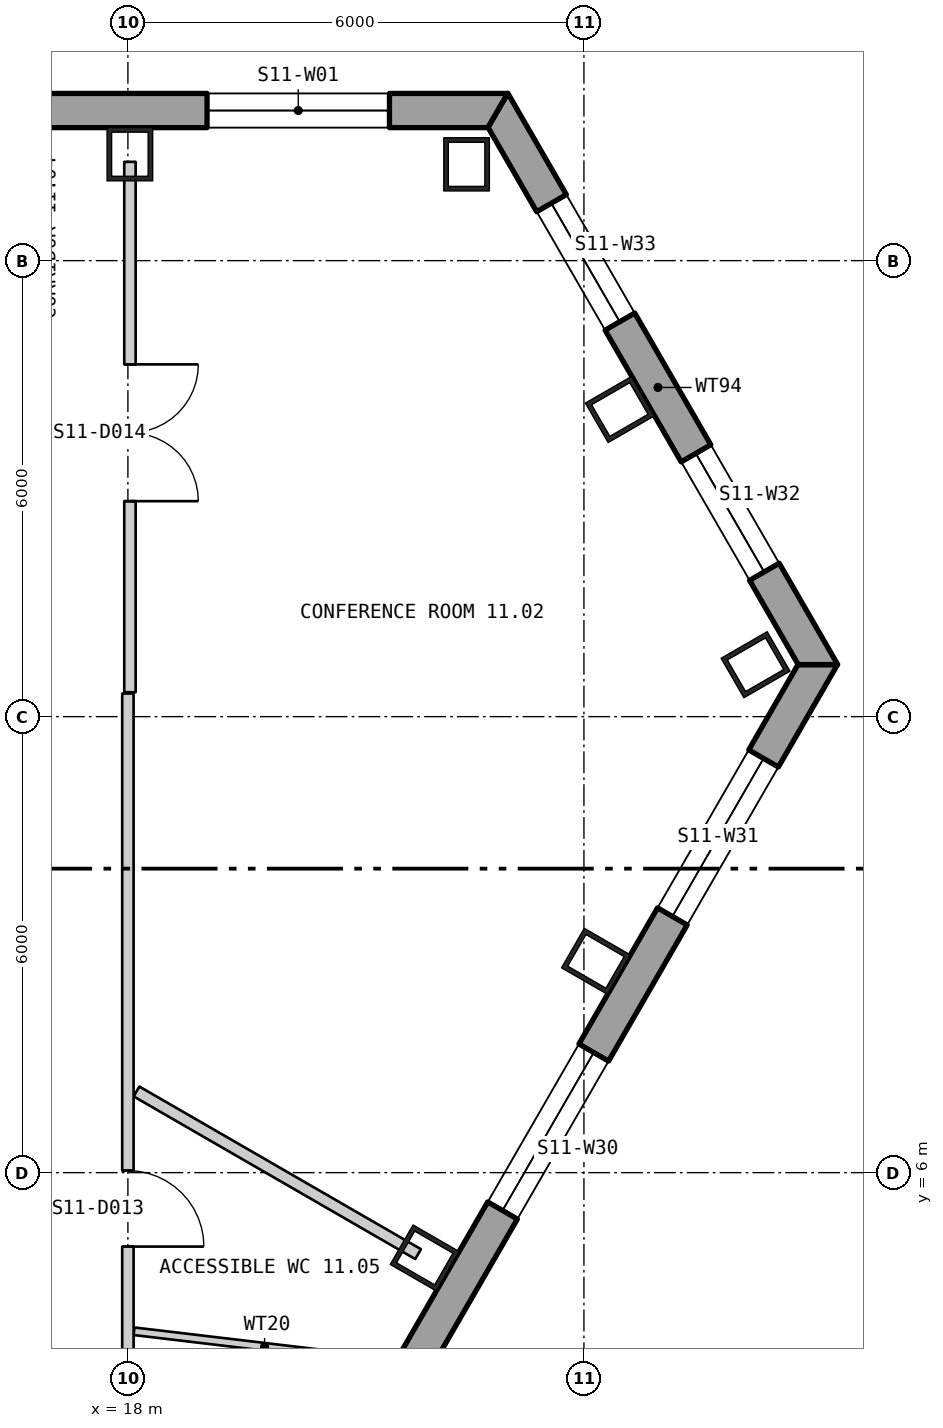
"""IFC4 building model, lengths in metres.
Left out: names, types, materials, properties, quantities, classifications, styles, units other than length and angle.
Written with IfcOpenShell. Run it as: python <this file> out.ifc"""

import sys

from ifc_helpers import new_model, si_unit, direction, frame, frame_2d, origin, origin_2d, place, context, subcontext, project, spatial, polyline, rectangle, hollow_rectangle, outline, extrude, element, fill, save


model = new_model("IFC4")
c1 = context("Model", 3, precision=1e-05, world=origin(), true_north=direction((0.0, 1.0)))
c2 = subcontext(c1, "Body", "Model", "MODEL_VIEW")
j1 = project(units=[si_unit("LENGTHUNIT", "METRE"), si_unit("PLANEANGLEUNIT", "RADIAN")], contexts=[c1])
p1 = place(None, origin())
s1 = spatial("IfcSite", under=j1, at=p1, CompositionType="ELEMENT")
p2 = place(p1, origin())
s2 = spatial("IfcBuilding", under=s1, at=p2, CompositionType="ELEMENT")
p3 = place(p2, frame((0.0, 0.0, 151.5)))
s3 = spatial("IfcBuildingStorey", under=s2, at=p3, CompositionType="ELEMENT", Elevation=151.5)
for number, where, z_axis, x_axis in (
    (1, (22.456, 19.267, 0.0), (0.0, 0.0, 1.0), (-1.0, 0.0, 0.0)),
    (2, (18.026, 19.4, 0.0), (0.0, 0.0, 1.0), (-1.0, 0.0, 0.0)),
    (3, (21.905, 4.877, 0.0), (0.0, 0.0, 1.0), (0.5, 0.866, 0.0)),
    (4, (24.158, 8.78, 0.0), (0.0, 0.0, 1.0), (0.5, 0.866, 0.0)),
    (5, (26.258, 12.683, 0.0), (0.0, 0.0, 1.0), (-0.5, 0.866, 0.0)),
    (6, (24.472, 16.041, 0.0), (0.0, 0.0, 1.0), (-0.5, 0.866, 0.0)),
):
    element("IfcColumn", number, at=place(p3, frame(where, z_axis=z_axis, x_axis=x_axis)), inside=s3, PredefinedType="COLUMN", context=c2, shape_type="SweptSolid", body=[
        extrude(hollow_rectangle(XDim=0.6, YDim=0.7, WallThickness=0.06, at=origin_2d()), origin(), (0.0, 0.0, 1.0), 3.9),
    ])
p4 = place(p3, frame((22.865, 19.975, -0.4), z_axis=(0.0, 0.0, 1.0), x_axis=(-1.0, 0.0, 0.0)))
e7 = element("IfcWall", 7, at=p4, inside=s3, PredefinedType="SOLIDWALL", context=c2, shape_type="SweptSolid", body=[
    extrude(outline(polyline([(-0.13, -0.225), (45.86, -0.225), (45.6, 0.225), (0.13, 0.225), (-0.13, -0.225)])), origin(), (0.0, 0.0, 1.0), 3.9),
])
p5 = place(p4, frame((1.424, 0.0, 1.3)))
e8 = element("IfcOpeningElement", 8, at=p5, cuts=e7, PredefinedType="OPENING", context=c2, shape_type="SweptSolid", body=[
    extrude(rectangle(XDim=2.4, YDim=2.0, at=frame_2d((1.2, 1.0))), frame((0.0, 0.235, 0.0), z_axis=(0.0, -1.0, 0.0), x_axis=(1.0, 0.0, 0.0)), (0.0, 0.0, 1.0), 0.47),
])
p6 = place(p4, frame((10.399, 0.0, 1.3)))
e9 = element("IfcOpeningElement", 9, at=p6, cuts=e7, PredefinedType="OPENING", context=c2, shape_type="SweptSolid", body=[
    extrude(rectangle(XDim=2.4, YDim=2.0, at=frame_2d((1.2, 1.0))), frame((0.0, 0.235, 0.0), z_axis=(0.0, -1.0, 0.0), x_axis=(1.0, 0.0, 0.0)), (0.0, 0.0, 1.0), 0.47),
])
p7 = place(p4, frame((14.905, 0.0, 1.3)))
e10 = element("IfcOpeningElement", 10, at=p7, cuts=e7, PredefinedType="OPENING", context=c2, shape_type="SweptSolid", body=[
    extrude(rectangle(XDim=2.4, YDim=2.0, at=frame_2d((1.2, 1.0))), frame((0.0, 0.235, 0.0), z_axis=(0.0, -1.0, 0.0), x_axis=(1.0, 0.0, 0.0)), (0.0, 0.0, 1.0), 0.47),
])
p8 = place(p4, frame((19.412, 0.0, 1.3)))
e11 = element("IfcOpeningElement", 11, at=p8, cuts=e7, PredefinedType="OPENING", context=c2, shape_type="SweptSolid", body=[
    extrude(rectangle(XDim=2.4, YDim=2.0, at=frame_2d((1.2, 1.0))), frame((0.0, 0.235, 0.0), z_axis=(0.0, -1.0, 0.0), x_axis=(1.0, 0.0, 0.0)), (0.0, 0.0, 1.0), 0.47),
])
p9 = place(p4, frame((23.918, 0.0, 1.3)))
e12 = element("IfcOpeningElement", 12, at=p9, cuts=e7, PredefinedType="OPENING", context=c2, shape_type="SweptSolid", body=[
    extrude(rectangle(XDim=2.4, YDim=2.0, at=frame_2d((1.2, 1.0))), frame((0.0, 0.235, 0.0), z_axis=(0.0, -1.0, 0.0), x_axis=(1.0, 0.0, 0.0)), (0.0, 0.0, 1.0), 0.47),
])
p10 = place(p4, frame((28.425, 0.0, 1.3)))
e13 = element("IfcOpeningElement", 13, at=p10, cuts=e7, PredefinedType="OPENING", context=c2, shape_type="SweptSolid", body=[
    extrude(rectangle(XDim=2.4, YDim=2.0, at=frame_2d((1.2, 1.0))), frame((0.0, 0.235, 0.0), z_axis=(0.0, -1.0, 0.0), x_axis=(1.0, 0.0, 0.0)), (0.0, 0.0, 1.0), 0.47),
])
p11 = place(p4, frame((32.932, 0.0, 1.3)))
e14 = element("IfcOpeningElement", 14, at=p11, cuts=e7, PredefinedType="OPENING", context=c2, shape_type="SweptSolid", body=[
    extrude(rectangle(XDim=2.4, YDim=2.0, at=frame_2d((1.2, 1.0))), frame((0.0, 0.235, 0.0), z_axis=(0.0, -1.0, 0.0), x_axis=(1.0, 0.0, 0.0)), (0.0, 0.0, 1.0), 0.47),
])
p12 = place(p4, frame((37.438, 0.0, 1.3)))
e15 = element("IfcOpeningElement", 15, at=p12, cuts=e7, PredefinedType="OPENING", context=c2, shape_type="SweptSolid", body=[
    extrude(rectangle(XDim=2.4, YDim=2.0, at=frame_2d((1.2, 1.0))), frame((0.0, 0.235, 0.0), z_axis=(0.0, -1.0, 0.0), x_axis=(1.0, 0.0, 0.0)), (0.0, 0.0, 1.0), 0.47),
])
p13 = place(p4, frame((41.907, 0.0, 1.3)))
e16 = element("IfcOpeningElement", 16, at=p13, cuts=e7, PredefinedType="OPENING", context=c2, shape_type="SweptSolid", body=[
    extrude(rectangle(XDim=2.4, YDim=2.0, at=frame_2d((1.2, 1.0))), frame((0.0, 0.235, 0.0), z_axis=(0.0, -1.0, 0.0), x_axis=(1.0, 0.0, 0.0)), (0.0, 0.0, 1.0), 0.47),
])
p14 = place(p3, frame((4.21, -26.921, -0.18), z_axis=(0.0, 0.0, 1.0), x_axis=(0.500000141277, 0.866025322218, 0.0)))
e17 = element("IfcWall", 17, at=p14, inside=s3, PredefinedType="SOLIDWALL", context=c2, shape_type="SweptSolid", body=[
    extrude(outline(polyline([(-0.13, -0.225), (45.86, -0.225), (45.6, 0.225), (0.13, 0.225), (-0.13, -0.225)])), origin(), (0.0, 0.0, 1.0), 3.68),
])
p15 = place(p14, frame((1.424, 0.0, 1.08)))
e18 = element("IfcOpeningElement", 18, at=p15, cuts=e17, PredefinedType="OPENING", context=c2, shape_type="SweptSolid", body=[
    extrude(rectangle(XDim=2.4, YDim=2.0, at=frame_2d((1.2, 1.0))), frame((0.0, 0.235, 0.0), z_axis=(0.0, -1.0, 0.0), x_axis=(1.0, 0.0, 0.0)), (0.0, 0.0, 1.0), 0.47),
])
p16 = place(p14, frame((5.892, 0.0, 1.08)))
e19 = element("IfcOpeningElement", 19, at=p16, cuts=e17, PredefinedType="OPENING", context=c2, shape_type="SweptSolid", body=[
    extrude(rectangle(XDim=2.4, YDim=2.0, at=frame_2d((1.2, 1.0))), frame((0.0, 0.235, 0.0), z_axis=(0.0, -1.0, 0.0), x_axis=(1.0, 0.0, 0.0)), (0.0, 0.0, 1.0), 0.47),
])
p17 = place(p14, frame((10.399, 0.0, 1.08)))
e20 = element("IfcOpeningElement", 20, at=p17, cuts=e17, PredefinedType="OPENING", context=c2, shape_type="SweptSolid", body=[
    extrude(rectangle(XDim=2.4, YDim=2.0, at=frame_2d((1.2, 1.0))), frame((0.0, 0.235, 0.0), z_axis=(0.0, -1.0, 0.0), x_axis=(1.0, 0.0, 0.0)), (0.0, 0.0, 1.0), 0.47),
])
p18 = place(p14, frame((14.905, 0.0, 1.08)))
e21 = element("IfcOpeningElement", 21, at=p18, cuts=e17, PredefinedType="OPENING", context=c2, shape_type="SweptSolid", body=[
    extrude(rectangle(XDim=2.4, YDim=2.0, at=frame_2d((1.2, 1.0))), frame((0.0, 0.235, 0.0), z_axis=(0.0, -1.0, 0.0), x_axis=(1.0, 0.0, 0.0)), (0.0, 0.0, 1.0), 0.47),
])
p19 = place(p14, frame((19.412, 0.0, 1.08)))
e22 = element("IfcOpeningElement", 22, at=p19, cuts=e17, PredefinedType="OPENING", context=c2, shape_type="SweptSolid", body=[
    extrude(rectangle(XDim=2.4, YDim=2.0, at=frame_2d((1.2, 1.0))), frame((0.0, 0.235, 0.0), z_axis=(0.0, -1.0, 0.0), x_axis=(1.0, 0.0, 0.0)), (0.0, 0.0, 1.0), 0.47),
])
p20 = place(p14, frame((23.918, 0.0, 1.08)))
e23 = element("IfcOpeningElement", 23, at=p20, cuts=e17, PredefinedType="OPENING", context=c2, shape_type="SweptSolid", body=[
    extrude(rectangle(XDim=2.4, YDim=2.0, at=frame_2d((1.2, 1.0))), frame((0.0, 0.235, 0.0), z_axis=(0.0, -1.0, 0.0), x_axis=(1.0, 0.0, 0.0)), (0.0, 0.0, 1.0), 0.47),
])
p21 = place(p14, frame((37.438, 0.0, 1.08)))
e24 = element("IfcOpeningElement", 24, at=p21, cuts=e17, PredefinedType="OPENING", context=c2, shape_type="SweptSolid", body=[
    extrude(rectangle(XDim=2.4, YDim=2.0, at=frame_2d((1.2, 1.0))), frame((0.0, 0.235, 0.0), z_axis=(0.0, -1.0, 0.0), x_axis=(1.0, 0.0, 0.0)), (0.0, 0.0, 1.0), 0.47),
])
p22 = place(p14, frame((41.907, 0.0, 1.08)))
e25 = element("IfcOpeningElement", 25, at=p22, cuts=e17, PredefinedType="OPENING", context=c2, shape_type="SweptSolid", body=[
    extrude(rectangle(XDim=2.4, YDim=2.0, at=frame_2d((1.2, 1.0))), frame((0.0, 0.235, 0.0), z_axis=(0.0, -1.0, 0.0), x_axis=(1.0, 0.0, 0.0)), (0.0, 0.0, 1.0), 0.47),
])
p23 = place(p3, frame((27.079, 12.685, -0.4), z_axis=(0.0, 0.0, 1.0), x_axis=(-0.500000365375, 0.866025192835, 0.0)))
e26 = element("IfcWall", 26, at=p23, inside=s3, PredefinedType="SOLIDWALL", context=c2, shape_type="SweptSolid", body=[
    extrude(outline(polyline([(-0.13, -0.225), (8.55, -0.225), (8.29, 0.225), (0.13, 0.225), (-0.13, -0.225)])), origin(), (0.0, 0.0, 1.0), 3.9),
])
p24 = place(p23, frame((1.409, 0.0, 1.3)))
e27 = element("IfcOpeningElement", 27, at=p24, cuts=e26, PredefinedType="OPENING", context=c2, shape_type="SweptSolid", body=[
    extrude(rectangle(XDim=1.8, YDim=2.0, at=frame_2d((0.9, 1.0))), frame((0.0, 0.235, 0.0), z_axis=(0.0, -1.0, 0.0), x_axis=(1.0, 0.0, 0.0)), (0.0, 0.0, 1.0), 0.47),
])
p25 = place(p23, frame((5.211, 0.0, 1.3)))
e28 = element("IfcOpeningElement", 28, at=p25, cuts=e26, PredefinedType="OPENING", context=c2, shape_type="SweptSolid", body=[
    extrude(rectangle(XDim=1.8, YDim=2.0, at=frame_2d((0.9, 1.0))), frame((0.0, 0.235, 0.0), z_axis=(0.0, -1.0, 0.0), x_axis=(1.0, 0.0, 0.0)), (0.0, 0.0, 1.0), 0.47),
])
p26 = place(p3, frame((18.0, 0.125, 0.0), z_axis=(0.0, 0.0, 1.0), x_axis=(0.0, 1.0, 0.0)))
e29 = element("IfcWall", 29, at=p26, inside=s3, PredefinedType="PARTITIONING", context=c2, shape_type="SweptSolid", body=[
    extrude(rectangle(XDim=12.179, YDim=0.15, at=frame_2d((6.09, 0.0))), origin(), (0.0, 0.0, 1.0), 3.7),
])
p27 = place(p26, frame((1.992, 0.0, 0.0)))
e30 = element("IfcOpeningElement", 30, at=p27, cuts=e29, PredefinedType="OPENING", context=c2, shape_type="SweptSolid", body=[
    extrude(rectangle(XDim=1.0, YDim=2.1, at=frame_2d((0.5, 1.05))), frame((0.0, 0.085, 0.0), z_axis=(0.0, -1.0, 0.0), x_axis=(1.0, 0.0, 0.0)), (0.0, 0.0, 1.0), 0.17),
])
p28 = place(p26, frame((4.902, 0.0, 0.0)))
e31 = element("IfcOpeningElement", 31, at=p28, cuts=e29, PredefinedType="OPENING", context=c2, shape_type="SweptSolid", body=[
    extrude(rectangle(XDim=1.0, YDim=2.1, at=frame_2d((0.5, 1.05))), frame((0.0, 0.085, 0.0), z_axis=(0.0, -1.0, 0.0), x_axis=(1.0, 0.0, 0.0)), (0.0, 0.0, 1.0), 0.17),
])
p29 = place(p3, frame((18.027, 12.321, 0.0), z_axis=(0.0, 0.0, 1.0), x_axis=(0.0, 1.0, 0.0)))
e32 = element("IfcWall", 32, at=p29, inside=s3, PredefinedType="PARTITIONING", context=c2, shape_type="SweptSolid", body=[
    extrude(rectangle(XDim=6.979, YDim=0.15, at=frame_2d((3.49, 0.0))), origin(), (0.0, 0.0, 1.0), 3.7),
])
p30 = place(p29, frame((2.514, 0.0, 0.0)))
e33 = element("IfcOpeningElement", 33, at=p30, cuts=e32, PredefinedType="OPENING", context=c2, shape_type="SweptSolid", body=[
    extrude(rectangle(XDim=1.8, YDim=2.1, at=frame_2d((0.9, 1.05))), frame((0.0, 0.085, 0.0), z_axis=(0.0, -1.0, 0.0), x_axis=(1.0, 0.0, 0.0)), (0.0, 0.0, 1.0), 0.17),
])
p31 = place(p3, frame((18.081, 3.913, 0.0), z_axis=(0.0, 0.0, 1.0), x_axis=(0.993015725956, -0.11798206645, 0.0)))
e34 = element("IfcWall", 34, at=p31, inside=s3, PredefinedType="PARTITIONING", context=c2, shape_type="SweptSolid", body=[
    extrude(rectangle(XDim=3.458, YDim=0.1, at=frame_2d((1.729, 0.0))), origin(), (0.0, 0.0, 1.0), 3.7),
])
p32 = place(p3, frame((18.113, 7.068, 0.0), z_axis=(0.0, 0.0, 1.0), x_axis=(0.865932559475, -0.500160776593, 0.0)))
e35 = element("IfcWall", 35, at=p32, inside=s3, PredefinedType="PARTITIONING", context=c2, shape_type="SweptSolid", body=[
    extrude(rectangle(XDim=4.279, YDim=0.15, at=frame_2d((2.139, 0.0))), origin(), (0.0, 0.0, 1.0), 3.7),
])
p33 = place(p5, origin())
e36 = element("IfcWindow", 36, at=p33, inside=s3, PartitioningType="SINGLE_PANEL", PredefinedType="WINDOW", context=c2, shape_type="SweptSolid", body=[
    extrude(rectangle(XDim=2.4, YDim=2.0, at=frame_2d((1.2, 1.0))), frame((0.0, 0.105, 0.0), z_axis=(0.0, -1.0, 0.0), x_axis=(1.0, 0.0, 0.0)), (0.0, 0.0, 1.0), 0.06),
])
fill(e8, e36)
p34 = place(p21, origin())
e37 = element("IfcWindow", 37, at=p34, inside=s3, PartitioningType="SINGLE_PANEL", PredefinedType="WINDOW", context=c2, shape_type="SweptSolid", body=[
    extrude(rectangle(XDim=2.4, YDim=2.0, at=frame_2d((1.2, 1.0))), frame((0.0, 0.105, 0.0), z_axis=(0.0, -1.0, 0.0), x_axis=(1.0, 0.0, 0.0)), (0.0, 0.0, 1.0), 0.06),
])
fill(e24, e37)
p35 = place(p22, origin())
e38 = element("IfcWindow", 38, at=p35, inside=s3, PartitioningType="SINGLE_PANEL", PredefinedType="WINDOW", context=c2, shape_type="SweptSolid", body=[
    extrude(rectangle(XDim=2.4, YDim=2.0, at=frame_2d((1.2, 1.0))), frame((0.0, 0.105, 0.0), z_axis=(0.0, -1.0, 0.0), x_axis=(1.0, 0.0, 0.0)), (0.0, 0.0, 1.0), 0.06),
])
fill(e25, e38)
p36 = place(p24, origin())
e39 = element("IfcWindow", 39, at=p36, inside=s3, PartitioningType="SINGLE_PANEL", PredefinedType="WINDOW", context=c2, shape_type="SweptSolid", body=[
    extrude(rectangle(XDim=1.8, YDim=2.0, at=frame_2d((0.9, 1.0))), frame((0.0, 0.105, 0.0), z_axis=(0.0, -1.0, 0.0), x_axis=(1.0, 0.0, 0.0)), (0.0, 0.0, 1.0), 0.06),
])
fill(e27, e39)
p37 = place(p25, origin())
e40 = element("IfcWindow", 40, at=p37, inside=s3, PartitioningType="SINGLE_PANEL", PredefinedType="WINDOW", context=c2, shape_type="SweptSolid", body=[
    extrude(rectangle(XDim=1.8, YDim=2.0, at=frame_2d((0.9, 1.0))), frame((0.0, 0.105, 0.0), z_axis=(0.0, -1.0, 0.0), x_axis=(1.0, 0.0, 0.0)), (0.0, 0.0, 1.0), 0.06),
])
fill(e28, e40)
p38 = place(p28, origin())
e41 = element("IfcDoor", 41, at=p38, inside=s3, OperationType="SINGLE_SWING_LEFT", PredefinedType="DOOR", context=c2, shape_type="SweptSolid", body=[
    extrude(rectangle(XDim=1.0, YDim=2.1, at=frame_2d((0.5, 1.05))), frame((0.0, 0.025, 0.0), z_axis=(0.0, -1.0, 0.0), x_axis=(1.0, 0.0, 0.0)), (0.0, 0.0, 1.0), 0.05),
])
fill(e31, e41)
p39 = place(p30, origin())
e42 = element("IfcDoor", 42, at=p39, inside=s3, OperationType="DOUBLE_DOOR_SINGLE_SWING", PredefinedType="DOOR", context=c2, shape_type="SweptSolid", body=[
    extrude(rectangle(XDim=1.8, YDim=2.1, at=frame_2d((0.9, 1.05))), frame((0.0, 0.025, 0.0), z_axis=(0.0, -1.0, 0.0), x_axis=(1.0, 0.0, 0.0)), (0.0, 0.0, 1.0), 0.05),
])
fill(e33, e42)
save(model, sys.argv[1])
